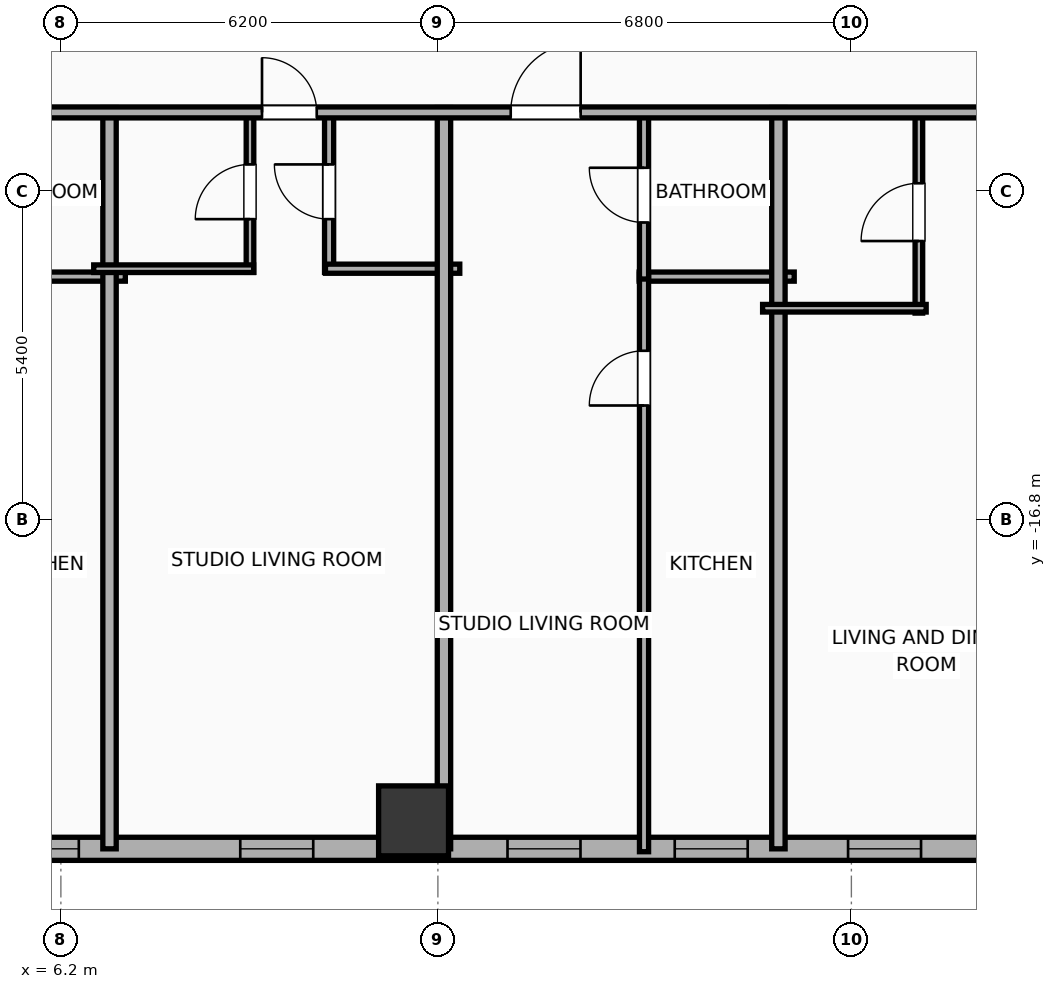
"""IFC4 building model, lengths in metres.
Left out: names, types, materials, properties, quantities, classifications, styles, units other than length and angle.
Written with IfcOpenShell. Run it as: python <this file> out.ifc"""

import sys

from ifc_helpers import new_model, si_unit, direction, frame, frame_2d, origin, origin_2d, place, context, subcontext, project, spatial, rectangle, hollow_rectangle, extrude, element, fill, save


model = new_model("IFC4")
c1 = context("Model", 3, precision=1e-05, world=origin(), true_north=direction((0.0, 1.0)))
c2 = subcontext(c1, "Body", "Model", "MODEL_VIEW")
j1 = project(units=[si_unit("LENGTHUNIT", "METRE"), si_unit("PLANEANGLEUNIT", "RADIAN")], contexts=[c1])
p1 = place(None, origin())
s1 = spatial("IfcSite", under=j1, at=p1, CompositionType="ELEMENT")
p2 = place(p1, origin())
s2 = spatial("IfcBuilding", under=s1, at=p2, CompositionType="ELEMENT")
p3 = place(p2, frame((0.0, 0.0, 68.9)))
s3 = spatial("IfcBuildingStorey", under=s2, at=p3, CompositionType="ELEMENT", Elevation=68.9)
p4 = place(p3, frame((12.0, -21.75, 0.0), z_axis=(0.0, 0.0, 1.0), x_axis=(1.0, 0.0, 0.0)))
e1 = element("IfcColumn", 1, at=p4, inside=s3, PredefinedType="COLUMN", context=c2, shape_type="SweptSolid", body=[
    extrude(hollow_rectangle(XDim=1.15, YDim=1.15, WallThickness=0.04, at=origin_2d()), origin(), (0.0, 0.0, 1.0), 3.9),
])
p5 = place(p3, frame((22.381, -22.21, 0.0), z_axis=(0.0, 0.0, 1.0), x_axis=(-1.0, 0.0, 0.0)))
e2 = element("IfcWall", 2, at=p5, inside=s3, PredefinedType="ELEMENTEDWALL", context=c2, shape_type="SweptSolid", body=[
    extrude(rectangle(XDim=51.963, YDim=0.38, at=frame_2d((25.981, 0.0))), origin(), (0.0, 0.0, 1.0), 3.65),
])
p6 = place(p5, frame((49.127, 0.0, 0.75)))
e3 = element("IfcOpeningElement", 3, at=p6, cuts=e2, PredefinedType="OPENING", context=c2, shape_type="SweptSolid", body=[
    extrude(rectangle(XDim=1.2, YDim=2.05, at=frame_2d((0.6, 1.025))), frame((0.0, 0.2, 0.0), z_axis=(0.0, -1.0, 0.0), x_axis=(1.0, 0.0, 0.0)), (0.0, 0.0, 1.0), 0.4),
])
p7 = place(p5, frame((43.926, 0.0, 0.75)))
e4 = element("IfcOpeningElement", 4, at=p7, cuts=e2, PredefinedType="OPENING", context=c2, shape_type="SweptSolid", body=[
    extrude(rectangle(XDim=1.2, YDim=2.05, at=frame_2d((0.6, 1.025))), frame((0.0, 0.2, 0.0), z_axis=(0.0, -1.0, 0.0), x_axis=(1.0, 0.0, 0.0)), (0.0, 0.0, 1.0), 0.4),
])
p8 = place(p5, frame((46.676, 0.0, 0.75)))
e5 = element("IfcOpeningElement", 5, at=p8, cuts=e2, PredefinedType="OPENING", context=c2, shape_type="SweptSolid", body=[
    extrude(rectangle(XDim=1.2, YDim=2.05, at=frame_2d((0.6, 1.025))), frame((0.0, 0.2, 0.0), z_axis=(0.0, -1.0, 0.0), x_axis=(1.0, 0.0, 0.0)), (0.0, 0.0, 1.0), 0.4),
])
p9 = place(p5, frame((39.531, 0.0, 0.75)))
e6 = element("IfcOpeningElement", 6, at=p9, cuts=e2, PredefinedType="OPENING", context=c2, shape_type="SweptSolid", body=[
    extrude(rectangle(XDim=1.2, YDim=2.05, at=frame_2d((0.6, 1.025))), frame((0.0, 0.2, 0.0), z_axis=(0.0, -1.0, 0.0), x_axis=(1.0, 0.0, 0.0)), (0.0, 0.0, 1.0), 0.4),
])
p10 = place(p5, frame((32.926, 0.0, 0.75)))
e7 = element("IfcOpeningElement", 7, at=p10, cuts=e2, PredefinedType="OPENING", context=c2, shape_type="SweptSolid", body=[
    extrude(rectangle(XDim=1.2, YDim=2.05, at=frame_2d((0.6, 1.025))), frame((0.0, 0.2, 0.0), z_axis=(0.0, -1.0, 0.0), x_axis=(1.0, 0.0, 0.0)), (0.0, 0.0, 1.0), 0.4),
])
p11 = place(p5, frame((35.676, 0.0, 0.75)))
e8 = element("IfcOpeningElement", 8, at=p11, cuts=e2, PredefinedType="OPENING", context=c2, shape_type="SweptSolid", body=[
    extrude(rectangle(XDim=1.2, YDim=2.05, at=frame_2d((0.6, 1.025))), frame((0.0, 0.2, 0.0), z_axis=(0.0, -1.0, 0.0), x_axis=(1.0, 0.0, 0.0)), (0.0, 0.0, 1.0), 0.4),
])
p12 = place(p5, frame((28.531, 0.0, 0.75)))
e9 = element("IfcOpeningElement", 9, at=p12, cuts=e2, PredefinedType="OPENING", context=c2, shape_type="SweptSolid", body=[
    extrude(rectangle(XDim=1.2, YDim=2.05, at=frame_2d((0.6, 1.025))), frame((0.0, 0.2, 0.0), z_axis=(0.0, -1.0, 0.0), x_axis=(1.0, 0.0, 0.0)), (0.0, 0.0, 1.0), 0.4),
])
p13 = place(p5, frame((21.926, 0.0, 0.75)))
e10 = element("IfcOpeningElement", 10, at=p13, cuts=e2, PredefinedType="OPENING", context=c2, shape_type="SweptSolid", body=[
    extrude(rectangle(XDim=1.2, YDim=2.05, at=frame_2d((0.6, 1.025))), frame((0.0, 0.2, 0.0), z_axis=(0.0, -1.0, 0.0), x_axis=(1.0, 0.0, 0.0)), (0.0, 0.0, 1.0), 0.4),
])
p14 = place(p5, frame((24.676, 0.0, 0.75)))
e11 = element("IfcOpeningElement", 11, at=p14, cuts=e2, PredefinedType="OPENING", context=c2, shape_type="SweptSolid", body=[
    extrude(rectangle(XDim=1.2, YDim=2.05, at=frame_2d((0.6, 1.025))), frame((0.0, 0.2, 0.0), z_axis=(0.0, -1.0, 0.0), x_axis=(1.0, 0.0, 0.0)), (0.0, 0.0, 1.0), 0.4),
])
p15 = place(p5, frame((18.636, 0.0, 0.75)))
e12 = element("IfcOpeningElement", 12, at=p15, cuts=e2, PredefinedType="OPENING", context=c2, shape_type="SweptSolid", body=[
    extrude(rectangle(XDim=1.2, YDim=2.05, at=frame_2d((0.6, 1.025))), frame((0.0, 0.2, 0.0), z_axis=(0.0, -1.0, 0.0), x_axis=(1.0, 0.0, 0.0)), (0.0, 0.0, 1.0), 0.4),
])
p16 = place(p5, frame((15.886, 0.0, 0.75)))
e13 = element("IfcOpeningElement", 13, at=p16, cuts=e2, PredefinedType="OPENING", context=c2, shape_type="SweptSolid", body=[
    extrude(rectangle(XDim=1.2, YDim=2.05, at=frame_2d((0.6, 1.025))), frame((0.0, 0.2, 0.0), z_axis=(0.0, -1.0, 0.0), x_axis=(1.0, 0.0, 0.0)), (0.0, 0.0, 1.0), 0.4),
])
p17 = place(p5, frame((12.031, 0.0, 0.75)))
e14 = element("IfcOpeningElement", 14, at=p17, cuts=e2, PredefinedType="OPENING", context=c2, shape_type="SweptSolid", body=[
    extrude(rectangle(XDim=1.2, YDim=2.05, at=frame_2d((0.6, 1.025))), frame((0.0, 0.2, 0.0), z_axis=(0.0, -1.0, 0.0), x_axis=(1.0, 0.0, 0.0)), (0.0, 0.0, 1.0), 0.4),
])
p18 = place(p5, frame((7.636, 0.0, 0.75)))
e15 = element("IfcOpeningElement", 15, at=p18, cuts=e2, PredefinedType="OPENING", context=c2, shape_type="SweptSolid", body=[
    extrude(rectangle(XDim=1.2, YDim=2.05, at=frame_2d((0.6, 1.025))), frame((0.0, 0.2, 0.0), z_axis=(0.0, -1.0, 0.0), x_axis=(1.0, 0.0, 0.0)), (0.0, 0.0, 1.0), 0.4),
])
p19 = place(p5, frame((4.886, 0.0, 0.75)))
e16 = element("IfcOpeningElement", 16, at=p19, cuts=e2, PredefinedType="OPENING", context=c2, shape_type="SweptSolid", body=[
    extrude(rectangle(XDim=1.2, YDim=2.05, at=frame_2d((0.6, 1.025))), frame((0.0, 0.2, 0.0), z_axis=(0.0, -1.0, 0.0), x_axis=(1.0, 0.0, 0.0)), (0.0, 0.0, 1.0), 0.4),
])
p20 = place(p5, frame((2.036, 0.0, 0.75)))
e17 = element("IfcOpeningElement", 17, at=p20, cuts=e2, PredefinedType="OPENING", context=c2, shape_type="SweptSolid", body=[
    extrude(rectangle(XDim=1.2, YDim=2.05, at=frame_2d((0.6, 1.025))), frame((0.0, 0.2, 0.0), z_axis=(0.0, -1.0, 0.0), x_axis=(1.0, 0.0, 0.0)), (0.0, 0.0, 1.0), 0.4),
])
p21 = place(p3, frame((4.71, -12.8, 0.0), z_axis=(0.0, 0.0, 1.0), x_axis=(1.0, 0.0, 0.0)))
e18 = element("IfcWall", 18, at=p21, inside=s3, PredefinedType="PLUMBINGWALL", context=c2, shape_type="SweptSolid", body=[
    extrude(rectangle(XDim=2.55, YDim=0.15, at=frame_2d((1.275, 0.0))), origin(), (0.0, 0.0, 1.0), 3.65),
])
p22 = place(p3, frame((7.0, -22.21, 0.0), z_axis=(0.0, 0.0, 1.0), x_axis=(0.0, 1.0, 0.0)))
e19 = element("IfcWall", 19, at=p22, inside=s3, PredefinedType="PARTITIONING", context=c2, shape_type="SweptSolid", body=[
    extrude(rectangle(XDim=12.19, YDim=0.22, at=frame_2d((6.095, 0.0))), origin(), (0.0, 0.0, 1.0), 3.65),
])
p23 = place(p3, frame((9.31, -12.73, 0.0), z_axis=(0.0, 0.0, 1.0), x_axis=(0.0, 1.0, 0.0)))
e20 = element("IfcWall", 20, at=p23, inside=s3, PredefinedType="PARTITIONING", context=c2, shape_type="SweptSolid", body=[
    extrude(rectangle(XDim=2.65, YDim=0.125, at=frame_2d((1.325, 0.0))), origin(), (0.0, 0.0, 1.0), 3.65),
])
p24 = place(p23, frame((0.875, 0.0, 0.0)))
e21 = element("IfcOpeningElement", 21, at=p24, cuts=e20, PredefinedType="OPENING", context=c2, shape_type="SweptSolid", body=[
    extrude(rectangle(XDim=0.9, YDim=2.05, at=frame_2d((0.45, 1.025))), frame((0.0, 0.073, 0.0), z_axis=(0.0, -1.0, 0.0), x_axis=(1.0, 0.0, 0.0)), (0.0, 0.0, 1.0), 0.145),
])
p25 = place(p3, frame((10.611, -12.73, 0.0), z_axis=(0.0, 0.0, 1.0), x_axis=(0.0, 1.0, 0.0)))
e22 = element("IfcWall", 22, at=p25, inside=s3, PredefinedType="PLUMBINGWALL", context=c2, shape_type="SweptSolid", body=[
    extrude(rectangle(XDim=2.65, YDim=0.15, at=frame_2d((1.325, 0.0))), origin(), (0.0, 0.0, 1.0), 3.65),
])
p26 = place(p25, frame((0.875, 0.0, 0.0)))
e23 = element("IfcOpeningElement", 23, at=p26, cuts=e22, PredefinedType="OPENING", context=c2, shape_type="SweptSolid", body=[
    extrude(rectangle(XDim=0.9, YDim=2.05, at=frame_2d((0.45, 1.025))), frame((0.0, 0.085, 0.0), z_axis=(0.0, -1.0, 0.0), x_axis=(1.0, 0.0, 0.0)), (0.0, 0.0, 1.0), 0.17),
])
p27 = place(p3, frame((6.74, -12.67, 0.0), z_axis=(0.0, 0.0, 1.0), x_axis=(1.0, 0.0, 0.0)))
e24 = element("IfcWall", 24, at=p27, inside=s3, PredefinedType="PARTITIONING", context=c2, shape_type="SweptSolid", body=[
    extrude(rectangle(XDim=2.63, YDim=0.125, at=frame_2d((1.315, 0.0))), origin(), (0.0, 0.0, 1.0), 3.65),
])
p28 = place(p3, frame((10.551, -12.67, 0.0), z_axis=(0.0, 0.0, 1.0), x_axis=(1.0, 0.0, 0.0)))
e25 = element("IfcWall", 25, at=p28, inside=s3, PredefinedType="PLUMBINGWALL", context=c2, shape_type="SweptSolid", body=[
    extrude(rectangle(XDim=2.209, YDim=0.15, at=frame_2d((1.104, 0.0))), origin(), (0.0, 0.0, 1.0), 3.65),
])
p29 = place(p3, frame((12.5, -22.21, 0.0), z_axis=(0.0, 0.0, 1.0), x_axis=(0.0, 1.0, 0.0)))
e26 = element("IfcWall", 26, at=p29, inside=s3, PredefinedType="PARTITIONING", context=c2, shape_type="SweptSolid", body=[
    extrude(rectangle(XDim=12.19, YDim=0.22, at=frame_2d((6.095, 0.0))), origin(), (0.0, 0.0, 1.0), 2.94),
])
p30 = place(p3, frame((15.71, -12.8, 0.0), z_axis=(0.0, 0.0, 1.0), x_axis=(1.0, 0.0, 0.0)))
e27 = element("IfcWall", 27, at=p30, inside=s3, PredefinedType="PLUMBINGWALL", context=c2, shape_type="SweptSolid", body=[
    extrude(rectangle(XDim=2.55, YDim=0.15, at=frame_2d((1.275, 0.0))), origin(), (0.0, 0.0, 1.0), 3.65),
])
p31 = place(p3, frame((15.79, -22.258, 0.0), z_axis=(0.0, 0.0, 1.0), x_axis=(0.0, 1.0, 0.0)))
e28 = element("IfcWall", 28, at=p31, inside=s3, PredefinedType="PLUMBINGWALL", context=c2, shape_type="SweptSolid", body=[
    extrude(rectangle(XDim=9.498, YDim=0.15, at=frame_2d((4.749, 0.0))), origin(), (0.0, 0.0, 1.0), 3.65),
])
p32 = place(p31, frame((7.338, 0.0, 0.0)))
e29 = element("IfcOpeningElement", 29, at=p32, cuts=e28, PredefinedType="OPENING", context=c2, shape_type="SweptSolid", body=[
    extrude(rectangle(XDim=0.9, YDim=2.05, at=frame_2d((0.45, 1.025))), frame((0.0, 0.085, 0.0), z_axis=(0.0, -1.0, 0.0), x_axis=(1.0, 0.0, 0.0)), (0.0, 0.0, 1.0), 0.17),
])
p33 = place(p3, frame((15.79, -12.84, 0.0), z_axis=(0.0, 0.0, 1.0), x_axis=(0.0, 1.0, 0.0)))
e30 = element("IfcWall", 30, at=p33, inside=s3, PredefinedType="PLUMBINGWALL", context=c2, shape_type="SweptSolid", body=[
    extrude(rectangle(XDim=2.76, YDim=0.15, at=frame_2d((1.38, 0.0))), origin(), (0.0, 0.0, 1.0), 3.65),
])
p34 = place(p33, frame((0.93, 0.0, 0.0)))
e31 = element("IfcOpeningElement", 31, at=p34, cuts=e30, PredefinedType="OPENING", context=c2, shape_type="SweptSolid", body=[
    extrude(rectangle(XDim=0.9, YDim=2.05, at=frame_2d((0.45, 1.025))), frame((0.0, 0.085, 0.0), z_axis=(0.0, -1.0, 0.0), x_axis=(1.0, 0.0, 0.0)), (0.0, 0.0, 1.0), 0.17),
])
p35 = place(p3, frame((18.0, -22.21, 0.0), z_axis=(0.0, 0.0, 1.0), x_axis=(0.0, 1.0, 0.0)))
e32 = element("IfcWall", 32, at=p35, inside=s3, PredefinedType="PARTITIONING", context=c2, shape_type="SweptSolid", body=[
    extrude(rectangle(XDim=12.19, YDim=0.22, at=frame_2d((6.095, 0.0))), origin(), (0.0, 0.0, 1.0), 3.65),
])
p36 = place(p3, frame((20.31, -13.4, 0.0), z_axis=(0.0, 0.0, 1.0), x_axis=(0.0, 1.0, 0.0)))
e33 = element("IfcWall", 33, at=p36, inside=s3, PredefinedType="PARTITIONING", context=c2, shape_type="SweptSolid", body=[
    extrude(rectangle(XDim=3.32, YDim=0.125, at=frame_2d((1.66, 0.0))), origin(), (0.0, 0.0, 1.0), 2.94),
])
p37 = place(p36, frame((1.185, 0.0, 0.0)))
e34 = element("IfcOpeningElement", 34, at=p37, cuts=e33, PredefinedType="OPENING", context=c2, shape_type="SweptSolid", body=[
    extrude(rectangle(XDim=0.95, YDim=2.05, at=frame_2d((0.475, 1.025))), frame((0.0, 0.073, 0.0), z_axis=(0.0, -1.0, 0.0), x_axis=(1.0, 0.0, 0.0)), (0.0, 0.0, 1.0), 0.145),
])
p38 = place(p3, frame((17.74, -13.32, 0.0), z_axis=(0.0, 0.0, 1.0), x_axis=(1.0, 0.0, 0.0)))
e35 = element("IfcWall", 35, at=p38, inside=s3, PredefinedType="PARTITIONING", context=c2, shape_type="SweptSolid", body=[
    extrude(rectangle(XDim=2.69, YDim=0.125, at=frame_2d((1.345, 0.0))), origin(), (0.0, 0.0, 1.0), 3.65),
])
p39 = place(p3, frame((-33.41, -10.1, 0.0), z_axis=(0.0, 0.0, 1.0), x_axis=(1.0, 0.0, 0.0)))
e36 = element("IfcWall", 36, at=p39, inside=s3, PredefinedType="PARTITIONING", context=c2, shape_type="SweptSolid", body=[
    extrude(rectangle(XDim=59.62, YDim=0.18, at=frame_2d((29.81, 0.0))), origin(), (0.0, 0.0, 1.0), 3.65),
])
p40 = place(p39, frame((3.259, 0.0, 0.0)))
e37 = element("IfcOpeningElement", 37, at=p40, cuts=e36, PredefinedType="OPENING", context=c2, shape_type="SweptSolid", body=[
    extrude(rectangle(XDim=1.15, YDim=2.05, at=frame_2d((0.575, 1.025))), frame((0.0, 0.1, 0.0), z_axis=(0.0, -1.0, 0.0), x_axis=(1.0, 0.0, 0.0)), (0.0, 0.0, 1.0), 0.2),
])
p41 = place(p39, frame((10.657, 0.0, 0.0)))
e38 = element("IfcOpeningElement", 38, at=p41, cuts=e36, PredefinedType="OPENING", context=c2, shape_type="SweptSolid", body=[
    extrude(rectangle(XDim=1.15, YDim=2.05, at=frame_2d((0.575, 1.025))), frame((0.0, 0.1, 0.0), z_axis=(0.0, -1.0, 0.0), x_axis=(1.0, 0.0, 0.0)), (0.0, 0.0, 1.0), 0.2),
])
p42 = place(p39, frame((15.421, 0.0, 0.0)))
e39 = element("IfcOpeningElement", 39, at=p42, cuts=e36, PredefinedType="OPENING", context=c2, shape_type="SweptSolid", body=[
    extrude(rectangle(XDim=0.9, YDim=2.05, at=frame_2d((0.45, 1.025))), frame((0.0, 0.1, 0.0), z_axis=(0.0, -1.0, 0.0), x_axis=(1.0, 0.0, 0.0)), (0.0, 0.0, 1.0), 0.2),
])
p43 = place(p39, frame((21.657, 0.0, 0.0)))
e40 = element("IfcOpeningElement", 40, at=p43, cuts=e36, PredefinedType="OPENING", context=c2, shape_type="SweptSolid", body=[
    extrude(rectangle(XDim=1.15, YDim=2.05, at=frame_2d((0.575, 1.025))), frame((0.0, 0.1, 0.0), z_axis=(0.0, -1.0, 0.0), x_axis=(1.0, 0.0, 0.0)), (0.0, 0.0, 1.0), 0.2),
])
p44 = place(p39, frame((26.421, 0.0, 0.0)))
e41 = element("IfcOpeningElement", 41, at=p44, cuts=e36, PredefinedType="OPENING", context=c2, shape_type="SweptSolid", body=[
    extrude(rectangle(XDim=0.9, YDim=2.05, at=frame_2d((0.45, 1.025))), frame((0.0, 0.1, 0.0), z_axis=(0.0, -1.0, 0.0), x_axis=(1.0, 0.0, 0.0)), (0.0, 0.0, 1.0), 0.2),
])
p45 = place(p39, frame((32.657, 0.0, 0.0)))
e42 = element("IfcOpeningElement", 42, at=p45, cuts=e36, PredefinedType="OPENING", context=c2, shape_type="SweptSolid", body=[
    extrude(rectangle(XDim=1.15, YDim=2.05, at=frame_2d((0.575, 1.025))), frame((0.0, 0.1, 0.0), z_axis=(0.0, -1.0, 0.0), x_axis=(1.0, 0.0, 0.0)), (0.0, 0.0, 1.0), 0.2),
])
p46 = place(p39, frame((36.008, 0.0, 0.0)))
e43 = element("IfcOpeningElement", 43, at=p46, cuts=e36, PredefinedType="OPENING", context=c2, shape_type="SweptSolid", body=[
    extrude(rectangle(XDim=1.15, YDim=2.05, at=frame_2d((0.575, 1.025))), frame((0.0, 0.1, 0.0), z_axis=(0.0, -1.0, 0.0), x_axis=(1.0, 0.0, 0.0)), (0.0, 0.0, 1.0), 0.2),
])
p47 = place(p39, frame((42.917, 0.0, 0.0)))
e44 = element("IfcOpeningElement", 44, at=p47, cuts=e36, PredefinedType="OPENING", context=c2, shape_type="SweptSolid", body=[
    extrude(rectangle(XDim=0.9, YDim=2.05, at=frame_2d((0.45, 1.025))), frame((0.0, 0.1, 0.0), z_axis=(0.0, -1.0, 0.0), x_axis=(1.0, 0.0, 0.0)), (0.0, 0.0, 1.0), 0.2),
])
p48 = place(p39, frame((47.008, 0.0, 0.0)))
e45 = element("IfcOpeningElement", 45, at=p48, cuts=e36, PredefinedType="OPENING", context=c2, shape_type="SweptSolid", body=[
    extrude(rectangle(XDim=1.15, YDim=2.05, at=frame_2d((0.575, 1.025))), frame((0.0, 0.1, 0.0), z_axis=(0.0, -1.0, 0.0), x_axis=(1.0, 0.0, 0.0)), (0.0, 0.0, 1.0), 0.2),
])
p49 = place(p39, frame((55.14, 0.0, 0.0)))
e46 = element("IfcOpeningElement", 46, at=p49, cuts=e36, PredefinedType="OPENING", context=c2, shape_type="SweptSolid", body=[
    extrude(rectangle(XDim=1.15, YDim=2.05, at=frame_2d((0.575, 1.025))), frame((0.0, 0.1, 0.0), z_axis=(0.0, -1.0, 0.0), x_axis=(1.0, 0.0, 0.0)), (0.0, 0.0, 1.0), 0.2),
])
p50 = place(p16, origin())
e47 = element("IfcWindow", 47, at=p50, inside=s3, PartitioningType="SINGLE_PANEL", PredefinedType="WINDOW", context=c2, shape_type="SweptSolid", body=[
    extrude(rectangle(XDim=1.2, YDim=2.05, at=frame_2d((0.6, 1.025))), frame((0.0, 0.03, 0.0), z_axis=(0.0, -1.0, 0.0), x_axis=(1.0, 0.0, 0.0)), (0.0, 0.0, 1.0), 0.06),
])
fill(e13, e47)
p51 = place(p17, origin())
e48 = element("IfcWindow", 48, at=p51, inside=s3, PartitioningType="SINGLE_PANEL", PredefinedType="WINDOW", context=c2, shape_type="SweptSolid", body=[
    extrude(rectangle(XDim=1.2, YDim=2.05, at=frame_2d((0.6, 1.025))), frame((0.0, 0.03, 0.0), z_axis=(0.0, -1.0, 0.0), x_axis=(1.0, 0.0, 0.0)), (0.0, 0.0, 1.0), 0.06),
])
fill(e14, e48)
p52 = place(p18, origin())
e49 = element("IfcWindow", 49, at=p52, inside=s3, PartitioningType="SINGLE_PANEL", PredefinedType="WINDOW", context=c2, shape_type="SweptSolid", body=[
    extrude(rectangle(XDim=1.2, YDim=2.05, at=frame_2d((0.6, 1.025))), frame((0.0, 0.03, 0.0), z_axis=(0.0, -1.0, 0.0), x_axis=(1.0, 0.0, 0.0)), (0.0, 0.0, 1.0), 0.06),
])
fill(e15, e49)
p53 = place(p19, origin())
e50 = element("IfcWindow", 50, at=p53, inside=s3, PartitioningType="SINGLE_PANEL", PredefinedType="WINDOW", context=c2, shape_type="SweptSolid", body=[
    extrude(rectangle(XDim=1.2, YDim=2.05, at=frame_2d((0.6, 1.025))), frame((0.0, 0.03, 0.0), z_axis=(0.0, -1.0, 0.0), x_axis=(1.0, 0.0, 0.0)), (0.0, 0.0, 1.0), 0.06),
])
fill(e16, e50)
p54 = place(p20, origin())
e51 = element("IfcWindow", 51, at=p54, inside=s3, PartitioningType="SINGLE_PANEL", PredefinedType="WINDOW", context=c2, shape_type="SweptSolid", body=[
    extrude(rectangle(XDim=1.2, YDim=2.05, at=frame_2d((0.6, 1.025))), frame((0.0, 0.03, 0.0), z_axis=(0.0, -1.0, 0.0), x_axis=(1.0, 0.0, 0.0)), (0.0, 0.0, 1.0), 0.06),
])
fill(e17, e51)
p55 = place(p24, origin())
e52 = element("IfcDoor", 52, at=p55, inside=s3, OperationType="SINGLE_SWING_LEFT", PredefinedType="DOOR", context=c2, shape_type="SweptSolid", body=[
    extrude(rectangle(XDim=0.9, YDim=2.05, at=frame_2d((0.45, 1.025))), frame((0.0, 0.025, 0.0), z_axis=(0.0, -1.0, 0.0), x_axis=(1.0, 0.0, 0.0)), (0.0, 0.0, 1.0), 0.05),
])
fill(e21, e52)
p56 = place(p26, origin())
e53 = element("IfcDoor", 53, at=p56, inside=s3, OperationType="SINGLE_SWING_RIGHT", PredefinedType="DOOR", context=c2, shape_type="SweptSolid", body=[
    extrude(rectangle(XDim=0.9, YDim=2.05, at=frame_2d((0.45, 1.025))), frame((0.0, 0.025, 0.0), z_axis=(0.0, -1.0, 0.0), x_axis=(1.0, 0.0, 0.0)), (0.0, 0.0, 1.0), 0.05),
])
fill(e23, e53)
p57 = place(p32, origin())
e54 = element("IfcDoor", 54, at=p57, inside=s3, OperationType="SINGLE_SWING_LEFT", PredefinedType="DOOR", context=c2, shape_type="SweptSolid", body=[
    extrude(rectangle(XDim=0.9, YDim=2.05, at=frame_2d((0.45, 1.025))), frame((0.0, 0.025, 0.0), z_axis=(0.0, -1.0, 0.0), x_axis=(1.0, 0.0, 0.0)), (0.0, 0.0, 1.0), 0.05),
])
fill(e29, e54)
p58 = place(p34, origin())
e55 = element("IfcDoor", 55, at=p58, inside=s3, OperationType="SINGLE_SWING_RIGHT", PredefinedType="DOOR", context=c2, shape_type="SweptSolid", body=[
    extrude(rectangle(XDim=0.9, YDim=2.05, at=frame_2d((0.45, 1.025))), frame((0.0, 0.025, 0.0), z_axis=(0.0, -1.0, 0.0), x_axis=(1.0, 0.0, 0.0)), (0.0, 0.0, 1.0), 0.05),
])
fill(e31, e55)
p59 = place(p37, origin())
e56 = element("IfcDoor", 56, at=p59, inside=s3, OperationType="SINGLE_SWING_LEFT", PredefinedType="DOOR", context=c2, shape_type="SweptSolid", body=[
    extrude(rectangle(XDim=0.95, YDim=2.05, at=frame_2d((0.475, 1.025))), frame((0.0, 0.025, 0.0), z_axis=(0.0, -1.0, 0.0), x_axis=(1.0, 0.0, 0.0)), (0.0, 0.0, 1.0), 0.05),
])
fill(e34, e56)
p60 = place(p47, origin())
e57 = element("IfcDoor", 57, at=p60, inside=s3, OperationType="SINGLE_SWING_LEFT", PredefinedType="DOOR", context=c2, shape_type="SweptSolid", body=[
    extrude(rectangle(XDim=0.9, YDim=2.05, at=frame_2d((0.45, 1.025))), frame((0.0, 0.025, 0.0), z_axis=(0.0, -1.0, 0.0), x_axis=(1.0, 0.0, 0.0)), (0.0, 0.0, 1.0), 0.05),
])
fill(e44, e57)
p61 = place(p48, origin())
e58 = element("IfcDoor", 58, at=p61, inside=s3, OperationType="SINGLE_SWING_RIGHT", PredefinedType="DOOR", context=c2, shape_type="SweptSolid", body=[
    extrude(rectangle(XDim=1.15, YDim=2.05, at=frame_2d((0.575, 1.025))), frame((0.0, 0.025, 0.0), z_axis=(0.0, -1.0, 0.0), x_axis=(1.0, 0.0, 0.0)), (0.0, 0.0, 1.0), 0.05),
])
fill(e45, e58)
save(model, sys.argv[1])
